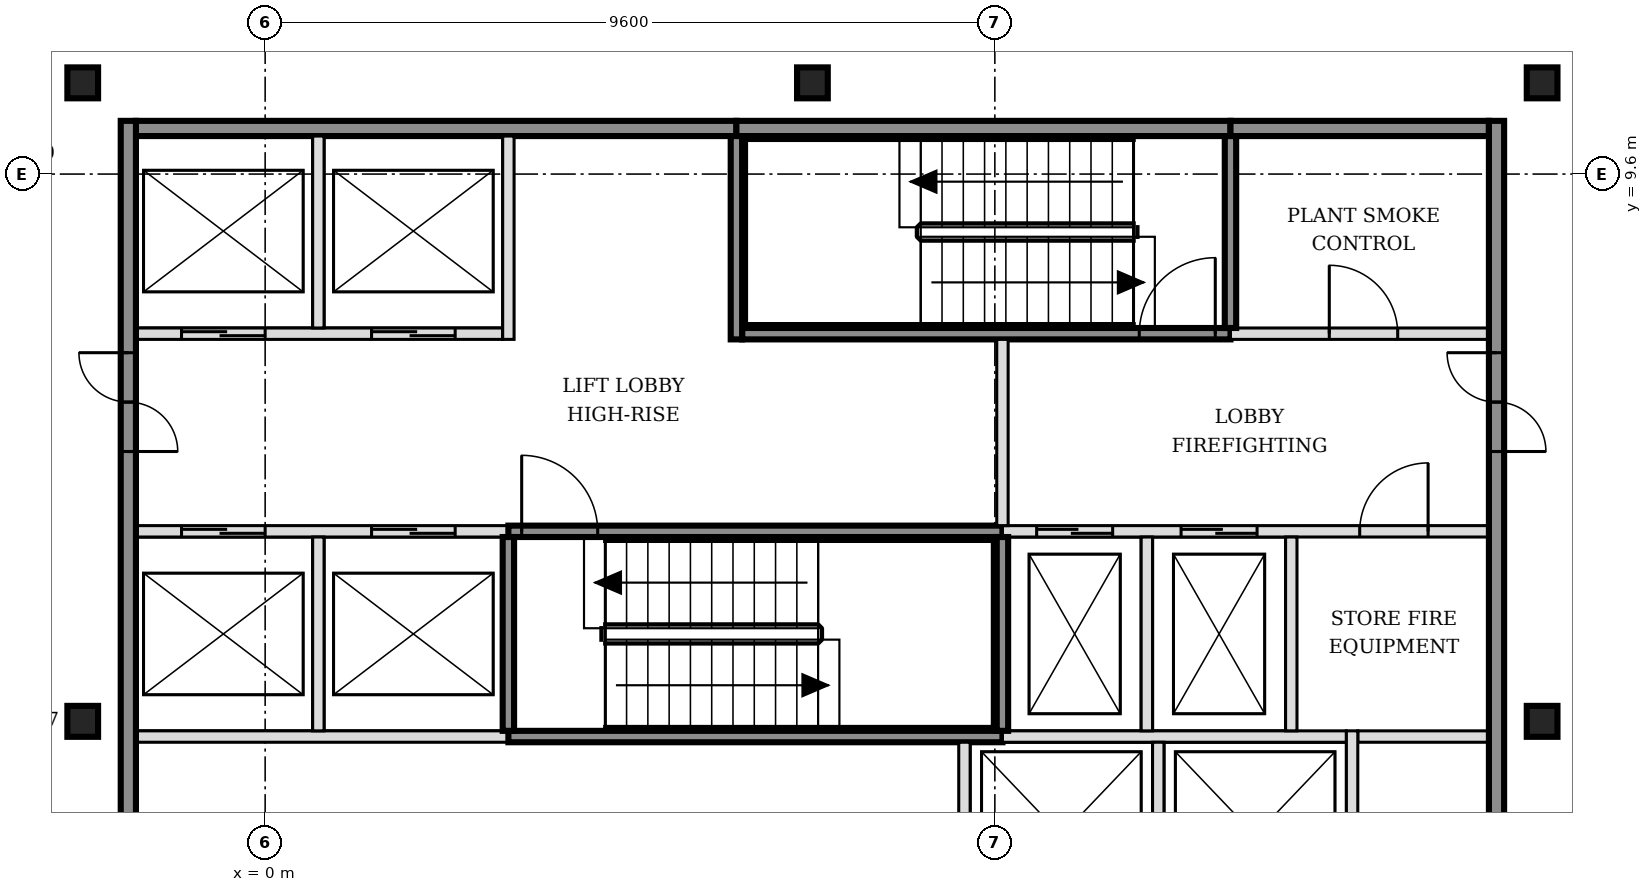
"""IFC4 building model, lengths in metres.
Left out: names, types, materials, properties, quantities, classifications, styles, units other than length and angle.
Written with IfcOpenShell. Run it as: python <this file> out.ifc"""

import sys

from ifc_helpers import new_model, si_unit, direction, frame, frame_2d, origin, origin_2d, place, context, subcontext, project, spatial, rectangle, i_section, extrude, element, fill, save


model = new_model("IFC4")
c1 = context("Model", 3, precision=1e-05, world=origin(), true_north=direction((0.0, 1.0)))
c2 = subcontext(c1, "Body", "Model", "MODEL_VIEW")
j1 = project(units=[si_unit("LENGTHUNIT", "METRE"), si_unit("PLANEANGLEUNIT", "RADIAN")], contexts=[c1])
p1 = place(None, origin())
s1 = spatial("IfcSite", under=j1, at=p1, CompositionType="ELEMENT")
p2 = place(p1, origin())
s2 = spatial("IfcBuilding", under=s1, at=p2, CompositionType="ELEMENT")
p3 = place(p2, frame((0.0, 0.0, 201.0)))
s3 = spatial("IfcBuildingStorey", under=s2, at=p3, CompositionType="ELEMENT", Elevation=201.0)
for number, where, z_axis, x_axis in (
    (1, (-2.4, 2.4, -0.15), (0.0, 0.0, 1.0), (1.0, 0.0, 0.0)),
    (2, (16.8, 2.4, -0.15), (0.0, 0.0, 1.0), (1.0, 0.0, 0.0)),
    (3, (-2.4, 10.8, -0.15), (0.0, 0.0, 1.0), (1.0, 0.0, 0.0)),
    (4, (7.2, 10.8, -0.15), (0.0, 0.0, 1.0), (1.0, 0.0, 0.0)),
    (5, (16.8, 10.8, -0.15), (0.0, 0.0, 1.0), (1.0, 0.0, 0.0)),
):
    element("IfcColumn", number, at=place(p3, frame(where, z_axis=z_axis, x_axis=x_axis)), inside=s3, PredefinedType="COLUMN", context=c2, shape_type="SweptSolid", body=[
        extrude(i_section(OverallWidth=0.404, OverallDepth=0.407, WebThickness=0.027, FlangeThickness=0.044, FilletRadius=0.015, at=origin_2d()), origin(), (0.0, 0.0, 1.0), 3.5),
    ])
p4 = place(p3, frame((-1.7, 2.2, 0.0), z_axis=(0.0, 0.0, 1.0), x_axis=(1.0, 0.0, 0.0)))
e6 = element("IfcWall", 6, at=p4, inside=s3, PredefinedType="SOLIDWALL", context=c2, shape_type="SweptSolid", body=[
    extrude(rectangle(XDim=4.9, YDim=0.15, at=frame_2d((2.45, 0.0))), origin(), (0.0, 0.0, 1.0), 3.35),
])
p5 = place(p3, frame((3.2, 2.2, 0.0), z_axis=(0.0, 0.0, 1.0), x_axis=(1.0, 0.0, 0.0)))
e7 = element("IfcWall", 7, at=p5, inside=s3, PredefinedType="SOLIDWALL", context=c2, shape_type="SweptSolid", body=[
    extrude(rectangle(XDim=6.5, YDim=0.15, at=frame_2d((3.25, 0.0))), origin(), (0.0, 0.0, 1.0), 3.35),
])
p6 = place(p3, frame((9.7, 2.2, 0.0), z_axis=(0.0, 0.0, 1.0), x_axis=(1.0, 0.0, 0.0)))
e8 = element("IfcWall", 8, at=p6, inside=s3, PredefinedType="SOLIDWALL", context=c2, shape_type="SweptSolid", body=[
    extrude(rectangle(XDim=4.525, YDim=0.15, at=frame_2d((2.263, 0.0))), origin(), (0.0, 0.0, 1.0), 3.35),
])
p7 = place(p3, frame((14.375, 2.2, 0.0), z_axis=(0.0, 0.0, 1.0), x_axis=(1.0, 0.0, 0.0)))
e9 = element("IfcWall", 9, at=p7, inside=s3, PredefinedType="PARTITIONING", context=c2, shape_type="SweptSolid", body=[
    extrude(rectangle(XDim=1.725, YDim=0.15, at=frame_2d((0.863, 0.0))), origin(), (0.0, 0.0, 1.0), 3.35),
])
p8 = place(p3, frame((-1.7, 4.9, 0.0), z_axis=(0.0, 0.0, 1.0), x_axis=(1.0, 0.0, 0.0)))
e10 = element("IfcWall", 10, at=p8, inside=s3, PredefinedType="SOLIDWALL", context=c2, shape_type="SweptSolid", body=[
    extrude(rectangle(XDim=4.9, YDim=0.15, at=frame_2d((2.45, 0.0))), origin(), (0.0, 0.0, 1.0), 3.35),
])
p9 = place(p8, frame((0.6, 0.0, 0.0)))
e11 = element("IfcOpeningElement", 11, at=p9, cuts=e10, PredefinedType="OPENING", context=c2, shape_type="SweptSolid", body=[
    extrude(rectangle(XDim=1.1, YDim=2.1, at=frame_2d((0.55, 1.05))), frame((0.0, 0.085, 0.0), z_axis=(0.0, -1.0, 0.0), x_axis=(1.0, 0.0, 0.0)), (0.0, 0.0, 1.0), 0.17),
])
p10 = place(p8, frame((3.1, 0.0, 0.0)))
e12 = element("IfcOpeningElement", 12, at=p10, cuts=e10, PredefinedType="OPENING", context=c2, shape_type="SweptSolid", body=[
    extrude(rectangle(XDim=1.1, YDim=2.1, at=frame_2d((0.55, 1.05))), frame((0.0, 0.085, 0.0), z_axis=(0.0, -1.0, 0.0), x_axis=(1.0, 0.0, 0.0)), (0.0, 0.0, 1.0), 0.17),
])
p11 = place(p3, frame((3.2, 4.9, 0.0), z_axis=(0.0, 0.0, 1.0), x_axis=(1.0, 0.0, 0.0)))
e13 = element("IfcWall", 13, at=p11, inside=s3, PredefinedType="SOLIDWALL", context=c2, shape_type="SweptSolid", body=[
    extrude(rectangle(XDim=6.5, YDim=0.15, at=frame_2d((3.25, 0.0))), origin(), (0.0, 0.0, 1.0), 3.35),
])
p12 = place(p11, frame((0.175, 0.0, 0.0)))
e14 = element("IfcOpeningElement", 14, at=p12, cuts=e13, PredefinedType="OPENING", context=c2, shape_type="SweptSolid", body=[
    extrude(rectangle(XDim=1.0, YDim=2.1, at=frame_2d((0.5, 1.05))), frame((0.0, 0.085, 0.0), z_axis=(0.0, -1.0, 0.0), x_axis=(1.0, 0.0, 0.0)), (0.0, 0.0, 1.0), 0.17),
])
p13 = place(p3, frame((9.7, 4.9, 0.0), z_axis=(0.0, 0.0, 1.0), x_axis=(1.0, 0.0, 0.0)))
e15 = element("IfcWall", 15, at=p13, inside=s3, PredefinedType="SOLIDWALL", context=c2, shape_type="SweptSolid", body=[
    extrude(rectangle(XDim=6.4, YDim=0.15, at=frame_2d((3.2, 0.0))), origin(), (0.0, 0.0, 1.0), 3.35),
])
p14 = place(p13, frame((0.45, 0.0, 0.0)))
e16 = element("IfcOpeningElement", 16, at=p14, cuts=e15, PredefinedType="OPENING", context=c2, shape_type="SweptSolid", body=[
    extrude(rectangle(XDim=1.0, YDim=2.1, at=frame_2d((0.5, 1.05))), frame((0.0, 0.085, 0.0), z_axis=(0.0, -1.0, 0.0), x_axis=(1.0, 0.0, 0.0)), (0.0, 0.0, 1.0), 0.17),
])
p15 = place(p13, frame((2.35, 0.0, 0.0)))
e17 = element("IfcOpeningElement", 17, at=p15, cuts=e15, PredefinedType="OPENING", context=c2, shape_type="SweptSolid", body=[
    extrude(rectangle(XDim=1.0, YDim=2.1, at=frame_2d((0.5, 1.05))), frame((0.0, 0.085, 0.0), z_axis=(0.0, -1.0, 0.0), x_axis=(1.0, 0.0, 0.0)), (0.0, 0.0, 1.0), 0.17),
])
p16 = place(p13, frame((4.7, 0.0, 0.0)))
e18 = element("IfcOpeningElement", 18, at=p16, cuts=e15, PredefinedType="OPENING", context=c2, shape_type="SweptSolid", body=[
    extrude(rectangle(XDim=0.9, YDim=2.1, at=frame_2d((0.45, 1.05))), frame((0.0, 0.085, 0.0), z_axis=(0.0, -1.0, 0.0), x_axis=(1.0, 0.0, 0.0)), (0.0, 0.0, 1.0), 0.17),
])
p17 = place(p3, frame((-1.7, 7.5, 0.0), z_axis=(0.0, 0.0, 1.0), x_axis=(1.0, 0.0, 0.0)))
e19 = element("IfcWall", 19, at=p17, inside=s3, PredefinedType="SOLIDWALL", context=c2, shape_type="SweptSolid", body=[
    extrude(rectangle(XDim=4.825, YDim=0.15, at=frame_2d((2.413, 0.0))), origin(), (0.0, 0.0, 1.0), 3.35),
])
p18 = place(p17, frame((0.6, 0.0, 0.0)))
e20 = element("IfcOpeningElement", 20, at=p18, cuts=e19, PredefinedType="OPENING", context=c2, shape_type="SweptSolid", body=[
    extrude(rectangle(XDim=1.1, YDim=2.1, at=frame_2d((0.55, 1.05))), frame((0.0, 0.085, 0.0), z_axis=(0.0, -1.0, 0.0), x_axis=(1.0, 0.0, 0.0)), (0.0, 0.0, 1.0), 0.17),
])
p19 = place(p17, frame((3.1, 0.0, 0.0)))
e21 = element("IfcOpeningElement", 21, at=p19, cuts=e19, PredefinedType="OPENING", context=c2, shape_type="SweptSolid", body=[
    extrude(rectangle(XDim=1.1, YDim=2.1, at=frame_2d((0.55, 1.05))), frame((0.0, 0.085, 0.0), z_axis=(0.0, -1.0, 0.0), x_axis=(1.0, 0.0, 0.0)), (0.0, 0.0, 1.0), 0.17),
])
p20 = place(p3, frame((6.275, 7.5, 0.0), z_axis=(0.0, 0.0, 1.0), x_axis=(1.0, 0.0, 0.0)))
e22 = element("IfcWall", 22, at=p20, inside=s3, PredefinedType="SOLIDWALL", context=c2, shape_type="SweptSolid", body=[
    extrude(rectangle(XDim=6.425, YDim=0.15, at=frame_2d((3.212, 0.0))), origin(), (0.0, 0.0, 1.0), 3.35),
])
p21 = place(p20, frame((5.225, 0.0, 0.0)))
e23 = element("IfcOpeningElement", 23, at=p21, cuts=e22, PredefinedType="OPENING", context=c2, shape_type="SweptSolid", body=[
    extrude(rectangle(XDim=1.0, YDim=2.1, at=frame_2d((0.5, 1.05))), frame((0.0, 0.085, 0.0), z_axis=(0.0, -1.0, 0.0), x_axis=(1.0, 0.0, 0.0)), (0.0, 0.0, 1.0), 0.17),
])
p22 = place(p3, frame((12.7, 7.5, 0.0), z_axis=(0.0, 0.0, 1.0), x_axis=(1.0, 0.0, 0.0)))
e24 = element("IfcWall", 24, at=p22, inside=s3, PredefinedType="SOLIDWALL", context=c2, shape_type="SweptSolid", body=[
    extrude(rectangle(XDim=3.4, YDim=0.15, at=frame_2d((1.7, 0.0))), origin(), (0.0, 0.0, 1.0), 3.35),
])
p23 = place(p22, frame((1.3, 0.0, 0.0)))
e25 = element("IfcOpeningElement", 25, at=p23, cuts=e24, PredefinedType="OPENING", context=c2, shape_type="SweptSolid", body=[
    extrude(rectangle(XDim=0.9, YDim=2.1, at=frame_2d((0.45, 1.05))), frame((0.0, 0.085, 0.0), z_axis=(0.0, -1.0, 0.0), x_axis=(1.0, 0.0, 0.0)), (0.0, 0.0, 1.0), 0.17),
])
p24 = place(p3, frame((-1.7, 10.2, 0.0), z_axis=(0.0, 0.0, 1.0), x_axis=(1.0, 0.0, 0.0)))
e26 = element("IfcWall", 26, at=p24, inside=s3, PredefinedType="SOLIDWALL", context=c2, shape_type="SweptSolid", body=[
    extrude(rectangle(XDim=7.9, YDim=0.2, at=frame_2d((3.95, 0.0))), origin(), (0.0, 0.0, 1.0), 3.35),
])
p25 = place(p3, frame((6.2, 10.2, 0.0), z_axis=(0.0, 0.0, 1.0), x_axis=(1.0, 0.0, 0.0)))
e27 = element("IfcWall", 27, at=p25, inside=s3, PredefinedType="SOLIDWALL", context=c2, shape_type="SweptSolid", body=[
    extrude(rectangle(XDim=6.5, YDim=0.2, at=frame_2d((3.25, 0.0))), origin(), (0.0, 0.0, 1.0), 3.35),
])
p26 = place(p3, frame((12.7, 10.2, 0.0), z_axis=(0.0, 0.0, 1.0), x_axis=(1.0, 0.0, 0.0)))
e28 = element("IfcWall", 28, at=p26, inside=s3, PredefinedType="SOLIDWALL", context=c2, shape_type="SweptSolid", body=[
    extrude(rectangle(XDim=3.4, YDim=0.2, at=frame_2d((1.7, 0.0))), origin(), (0.0, 0.0, 1.0), 3.35),
])
p27 = place(p3, frame((-1.8, -5.5, 0.0), z_axis=(0.0, 0.0, 1.0), x_axis=(0.0, 1.0, 0.0)))
e29 = element("IfcWall", 29, at=p27, inside=s3, PredefinedType="SOLIDWALL", context=c2, shape_type="SweptSolid", body=[
    extrude(rectangle(XDim=15.8, YDim=0.2, at=frame_2d((7.9, 0.0))), origin(), (0.0, 0.0, 1.0), 3.35),
])
p28 = place(p27, frame((3.05, 0.0, 0.0)))
e30 = element("IfcOpeningElement", 30, at=p28, cuts=e29, PredefinedType="OPENING", context=c2, shape_type="SweptSolid", body=[
    extrude(rectangle(XDim=1.3, YDim=2.1, at=frame_2d((0.65, 1.05))), frame((0.0, 0.11, 0.0), z_axis=(0.0, -1.0, 0.0), x_axis=(1.0, 0.0, 0.0)), (0.0, 0.0, 1.0), 0.22),
])
p29 = place(p27, frame((11.45, 0.0, 0.0)))
e31 = element("IfcOpeningElement", 31, at=p29, cuts=e29, PredefinedType="OPENING", context=c2, shape_type="SweptSolid", body=[
    extrude(rectangle(XDim=1.3, YDim=2.1, at=frame_2d((0.65, 1.05))), frame((0.0, 0.11, 0.0), z_axis=(0.0, -1.0, 0.0), x_axis=(1.0, 0.0, 0.0)), (0.0, 0.0, 1.0), 0.22),
])
p30 = place(p3, frame((0.7, 2.275, 0.0), z_axis=(0.0, 0.0, 1.0), x_axis=(0.0, 1.0, 0.0)))
e32 = element("IfcWall", 32, at=p30, inside=s3, PredefinedType="SOLIDWALL", context=c2, shape_type="SweptSolid", body=[
    extrude(rectangle(XDim=2.55, YDim=0.15, at=frame_2d((1.275, 0.0))), origin(), (0.0, 0.0, 1.0), 3.35),
])
p31 = place(p3, frame((0.7, 7.575, 0.0), z_axis=(0.0, 0.0, 1.0), x_axis=(0.0, 1.0, 0.0)))
e33 = element("IfcWall", 33, at=p31, inside=s3, PredefinedType="SOLIDWALL", context=c2, shape_type="SweptSolid", body=[
    extrude(rectangle(XDim=2.525, YDim=0.15, at=frame_2d((1.263, 0.0))), origin(), (0.0, 0.0, 1.0), 3.35),
])
p32 = place(p3, frame((3.2, 2.275, 0.0), z_axis=(0.0, 0.0, 1.0), x_axis=(0.0, 1.0, 0.0)))
e34 = element("IfcWall", 34, at=p32, inside=s3, PredefinedType="SOLIDWALL", context=c2, shape_type="SweptSolid", body=[
    extrude(rectangle(XDim=2.55, YDim=0.15, at=frame_2d((1.275, 0.0))), origin(), (0.0, 0.0, 1.0), 3.35),
])
for number, where, z_axis, x_axis in (
    (35, (3.2, 7.425, 0.0), (0.0, 0.0, 1.0), (0.0, 1.0, 0.0)),
    (36, (6.2, 7.425, 0.0), (0.0, 0.0, 1.0), (0.0, 1.0, 0.0)),
):
    element("IfcWall", number, at=place(p3, frame(where, z_axis=z_axis, x_axis=x_axis)), inside=s3, PredefinedType="SOLIDWALL", context=c2, shape_type="SweptSolid", body=[
        extrude(rectangle(XDim=2.675, YDim=0.15, at=frame_2d((1.337, 0.0))), origin(), (0.0, 0.0, 1.0), 3.35),
    ])
p33 = place(p3, frame((9.2, -0.475, 0.0), z_axis=(0.0, 0.0, 1.0), x_axis=(0.0, 1.0, 0.0)))
e37 = element("IfcWall", 37, at=p33, inside=s3, PredefinedType="SOLIDWALL", context=c2, shape_type="SweptSolid", body=[
    extrude(rectangle(XDim=2.6, YDim=0.15, at=frame_2d((1.3, 0.0))), origin(), (0.0, 0.0, 1.0), 3.35),
])
p34 = place(p3, frame((9.7, 2.275, 0.0), z_axis=(0.0, 0.0, 1.0), x_axis=(0.0, 1.0, 0.0)))
e38 = element("IfcWall", 38, at=p34, inside=s3, PredefinedType="SOLIDWALL", context=c2, shape_type="SweptSolid", body=[
    extrude(rectangle(XDim=2.55, YDim=0.15, at=frame_2d((1.275, 0.0))), origin(), (0.0, 0.0, 1.0), 3.35),
])
p35 = place(p3, frame((9.7, 4.975, 0.0), z_axis=(0.0, 0.0, 1.0), x_axis=(0.0, 1.0, 0.0)))
e39 = element("IfcWall", 39, at=p35, inside=s3, PredefinedType="SOLIDWALL", context=c2, shape_type="SweptSolid", body=[
    extrude(rectangle(XDim=2.45, YDim=0.15, at=frame_2d((1.225, 0.0))), origin(), (0.0, 0.0, 1.0), 3.35),
])
p36 = place(p3, frame((11.6, 2.275, 0.0), z_axis=(0.0, 0.0, 1.0), x_axis=(0.0, 1.0, 0.0)))
e40 = element("IfcWall", 40, at=p36, inside=s3, PredefinedType="SOLIDWALL", context=c2, shape_type="SweptSolid", body=[
    extrude(rectangle(XDim=2.55, YDim=0.15, at=frame_2d((1.275, 0.0))), origin(), (0.0, 0.0, 1.0), 3.35),
])
p37 = place(p3, frame((11.75, -0.325, 0.0), z_axis=(0.0, 0.0, 1.0), x_axis=(0.0, 1.0, 0.0)))
e41 = element("IfcWall", 41, at=p37, inside=s3, PredefinedType="SOLIDWALL", context=c2, shape_type="SweptSolid", body=[
    extrude(rectangle(XDim=2.45, YDim=0.15, at=frame_2d((1.225, 0.0))), origin(), (0.0, 0.0, 1.0), 3.35),
])
p38 = place(p3, frame((12.7, 7.575, 0.0), z_axis=(0.0, 0.0, 1.0), x_axis=(0.0, 1.0, 0.0)))
e42 = element("IfcWall", 42, at=p38, inside=s3, PredefinedType="SOLIDWALL", context=c2, shape_type="SweptSolid", body=[
    extrude(rectangle(XDim=2.525, YDim=0.15, at=frame_2d((1.263, 0.0))), origin(), (0.0, 0.0, 1.0), 3.35),
])
p39 = place(p3, frame((13.5, 2.275, 0.0), z_axis=(0.0, 0.0, 1.0), x_axis=(0.0, 1.0, 0.0)))
e43 = element("IfcWall", 43, at=p39, inside=s3, PredefinedType="SOLIDWALL", context=c2, shape_type="SweptSolid", body=[
    extrude(rectangle(XDim=2.55, YDim=0.15, at=frame_2d((1.275, 0.0))), origin(), (0.0, 0.0, 1.0), 3.35),
])
p40 = place(p3, frame((14.3, -0.475, 0.0), z_axis=(0.0, 0.0, 1.0), x_axis=(0.0, 1.0, 0.0)))
e44 = element("IfcWall", 44, at=p40, inside=s3, PredefinedType="SOLIDWALL", context=c2, shape_type="SweptSolid", body=[
    extrude(rectangle(XDim=2.75, YDim=0.15, at=frame_2d((1.375, 0.0))), origin(), (0.0, 0.0, 1.0), 3.35),
])
p41 = place(p3, frame((16.2, -5.5, 0.0), z_axis=(0.0, 0.0, 1.0), x_axis=(0.0, 1.0, 0.0)))
e45 = element("IfcWall", 45, at=p41, inside=s3, PredefinedType="SOLIDWALL", context=c2, shape_type="SweptSolid", body=[
    extrude(rectangle(XDim=15.8, YDim=0.2, at=frame_2d((7.9, 0.0))), origin(), (0.0, 0.0, 1.0), 3.35),
])
p42 = place(p41, frame((3.05, 0.0, 0.0)))
e46 = element("IfcOpeningElement", 46, at=p42, cuts=e45, PredefinedType="OPENING", context=c2, shape_type="SweptSolid", body=[
    extrude(rectangle(XDim=1.3, YDim=2.1, at=frame_2d((0.65, 1.05))), frame((0.0, 0.11, 0.0), z_axis=(0.0, -1.0, 0.0), x_axis=(1.0, 0.0, 0.0)), (0.0, 0.0, 1.0), 0.22),
])
p43 = place(p41, frame((11.45, 0.0, 0.0)))
e47 = element("IfcOpeningElement", 47, at=p43, cuts=e45, PredefinedType="OPENING", context=c2, shape_type="SweptSolid", body=[
    extrude(rectangle(XDim=1.3, YDim=2.1, at=frame_2d((0.65, 1.05))), frame((0.0, 0.11, 0.0), z_axis=(0.0, -1.0, 0.0), x_axis=(1.0, 0.0, 0.0)), (0.0, 0.0, 1.0), 0.22),
])
p44 = place(p9, origin())
e48 = element("IfcDoor", 48, at=p44, inside=s3, OperationType="DOUBLE_DOOR_SLIDING", PredefinedType="DOOR", context=c2, shape_type="SweptSolid", body=[
    extrude(rectangle(XDim=1.1, YDim=2.1, at=frame_2d((0.55, 1.05))), frame((0.0, 0.025, 0.0), z_axis=(0.0, -1.0, 0.0), x_axis=(1.0, 0.0, 0.0)), (0.0, 0.0, 1.0), 0.05),
])
fill(e11, e48)
p45 = place(p10, origin())
e49 = element("IfcDoor", 49, at=p45, inside=s3, OperationType="DOUBLE_DOOR_SLIDING", PredefinedType="DOOR", context=c2, shape_type="SweptSolid", body=[
    extrude(rectangle(XDim=1.1, YDim=2.1, at=frame_2d((0.55, 1.05))), frame((0.0, 0.025, 0.0), z_axis=(0.0, -1.0, 0.0), x_axis=(1.0, 0.0, 0.0)), (0.0, 0.0, 1.0), 0.05),
])
fill(e12, e49)
p46 = place(p18, origin())
e50 = element("IfcDoor", 50, at=p46, inside=s3, OperationType="DOUBLE_DOOR_SLIDING", PredefinedType="DOOR", context=c2, shape_type="SweptSolid", body=[
    extrude(rectangle(XDim=1.1, YDim=2.1, at=frame_2d((0.55, 1.05))), frame((0.0, 0.025, 0.0), z_axis=(0.0, -1.0, 0.0), x_axis=(1.0, 0.0, 0.0)), (0.0, 0.0, 1.0), 0.05),
])
fill(e20, e50)
p47 = place(p19, origin())
e51 = element("IfcDoor", 51, at=p47, inside=s3, OperationType="DOUBLE_DOOR_SLIDING", PredefinedType="DOOR", context=c2, shape_type="SweptSolid", body=[
    extrude(rectangle(XDim=1.1, YDim=2.1, at=frame_2d((0.55, 1.05))), frame((0.0, 0.025, 0.0), z_axis=(0.0, -1.0, 0.0), x_axis=(1.0, 0.0, 0.0)), (0.0, 0.0, 1.0), 0.05),
])
fill(e21, e51)
p48 = place(p14, origin())
e52 = element("IfcDoor", 52, at=p48, inside=s3, OperationType="DOUBLE_DOOR_SLIDING", PredefinedType="DOOR", context=c2, shape_type="SweptSolid", body=[
    extrude(rectangle(XDim=1.0, YDim=2.1, at=frame_2d((0.5, 1.05))), frame((0.0, 0.025, 0.0), z_axis=(0.0, -1.0, 0.0), x_axis=(1.0, 0.0, 0.0)), (0.0, 0.0, 1.0), 0.05),
])
fill(e16, e52)
p49 = place(p15, origin())
e53 = element("IfcDoor", 53, at=p49, inside=s3, OperationType="DOUBLE_DOOR_SLIDING", PredefinedType="DOOR", context=c2, shape_type="SweptSolid", body=[
    extrude(rectangle(XDim=1.0, YDim=2.1, at=frame_2d((0.5, 1.05))), frame((0.0, 0.025, 0.0), z_axis=(0.0, -1.0, 0.0), x_axis=(1.0, 0.0, 0.0)), (0.0, 0.0, 1.0), 0.05),
])
fill(e17, e53)
p50 = place(p12, origin())
e54 = element("IfcDoor", 54, at=p50, inside=s3, OperationType="SINGLE_SWING_LEFT", PredefinedType="DOOR", context=c2, shape_type="SweptSolid", body=[
    extrude(rectangle(XDim=1.0, YDim=2.1, at=frame_2d((0.5, 1.05))), frame((0.0, 0.025, 0.0), z_axis=(0.0, -1.0, 0.0), x_axis=(1.0, 0.0, 0.0)), (0.0, 0.0, 1.0), 0.05),
])
fill(e14, e54)
p51 = place(p21, origin())
e55 = element("IfcDoor", 55, at=p51, inside=s3, OperationType="SINGLE_SWING_RIGHT", PredefinedType="DOOR", context=c2, shape_type="SweptSolid", body=[
    extrude(rectangle(XDim=1.0, YDim=2.1, at=frame_2d((0.5, 1.05))), frame((0.0, 0.025, 0.0), z_axis=(0.0, -1.0, 0.0), x_axis=(1.0, 0.0, 0.0)), (0.0, 0.0, 1.0), 0.05),
])
fill(e23, e55)
p52 = place(p29, origin())
e56 = element("IfcDoor", 56, at=p52, inside=s3, OperationType="DOUBLE_DOOR_SINGLE_SWING", PredefinedType="DOOR", context=c2, shape_type="SweptSolid", body=[
    extrude(rectangle(XDim=1.3, YDim=2.1, at=frame_2d((0.65, 1.05))), frame((0.0, 0.025, 0.0), z_axis=(0.0, -1.0, 0.0), x_axis=(1.0, 0.0, 0.0)), (0.0, 0.0, 1.0), 0.05),
])
fill(e31, e56)
p53 = place(p43, origin())
e57 = element("IfcDoor", 57, at=p53, inside=s3, OperationType="DOUBLE_DOOR_SINGLE_SWING", PredefinedType="DOOR", context=c2, shape_type="SweptSolid", body=[
    extrude(rectangle(XDim=1.3, YDim=2.1, at=frame_2d((0.65, 1.05))), frame((0.0, 0.025, 0.0), z_axis=(0.0, -1.0, 0.0), x_axis=(1.0, 0.0, 0.0)), (0.0, 0.0, 1.0), 0.05),
])
fill(e47, e57)
p54 = place(p16, origin())
e58 = element("IfcDoor", 58, at=p54, inside=s3, OperationType="SINGLE_SWING_RIGHT", PredefinedType="DOOR", context=c2, shape_type="SweptSolid", body=[
    extrude(rectangle(XDim=0.9, YDim=2.1, at=frame_2d((0.45, 1.05))), frame((0.0, 0.025, 0.0), z_axis=(0.0, -1.0, 0.0), x_axis=(1.0, 0.0, 0.0)), (0.0, 0.0, 1.0), 0.05),
])
fill(e18, e58)
p55 = place(p23, origin())
e59 = element("IfcDoor", 59, at=p55, inside=s3, OperationType="SINGLE_SWING_LEFT", PredefinedType="DOOR", context=c2, shape_type="SweptSolid", body=[
    extrude(rectangle(XDim=0.9, YDim=2.1, at=frame_2d((0.45, 1.05))), frame((0.0, 0.025, 0.0), z_axis=(0.0, -1.0, 0.0), x_axis=(1.0, 0.0, 0.0)), (0.0, 0.0, 1.0), 0.05),
])
fill(e25, e59)
save(model, sys.argv[1])
